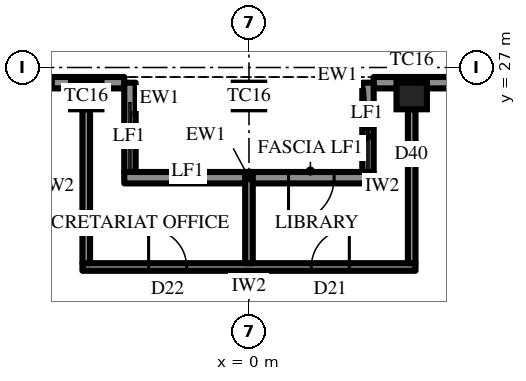
"""IFC4 building model, lengths in metres.
Left out: names, types, materials, properties, quantities, classifications, styles, units other than length and angle.
Written with IfcOpenShell. Run it as: python <this file> out.ifc"""

import sys

from ifc_helpers import new_model, si_unit, direction, frame, frame_2d, origin, origin_2d, place, context, subcontext, project, spatial, rectangle, extrude, element, fill, save


model = new_model("IFC4")
c1 = context("Model", 3, precision=1e-05, world=origin(), true_north=direction((0.0, 1.0)))
c2 = subcontext(c1, "Body", "Model", "MODEL_VIEW")
j1 = project(units=[si_unit("LENGTHUNIT", "METRE"), si_unit("PLANEANGLEUNIT", "RADIAN")], contexts=[c1])
p1 = place(None, origin())
s1 = spatial("IfcSite", under=j1, at=p1, CompositionType="ELEMENT")
p2 = place(p1, origin())
s2 = spatial("IfcBuilding", under=s1, at=p2, CompositionType="ELEMENT")
p3 = place(p2, frame((0.0, 0.0, 382.9)))
s3 = spatial("IfcBuildingStorey", under=s2, at=p3, CompositionType="ELEMENT", Elevation=382.9)
for number, where, z_axis, x_axis in (
    (1, (4.282, 26.25, 0.0), (0.0, 0.0, 1.0), (-1.0, 0.0, 0.0)),
    (2, (0.0, 26.25, 0.0), (0.0, 0.0, 1.0), (-1.0, 0.0, 0.0)),
    (3, (-4.282, 26.25, 0.0), (0.0, 0.0, 1.0), (-1.0, 0.0, 0.0)),
):
    element("IfcColumn", number, at=place(p3, frame(where, z_axis=z_axis, x_axis=x_axis)), inside=s3, PredefinedType="COLUMN", context=c2, shape_type="SweptSolid", body=[
        extrude(rectangle(XDim=0.8, YDim=0.7, at=origin_2d()), origin(), (0.0, 0.0, 1.0), 4.2),
    ])
p4 = place(p3, frame((12.846, 26.6, 0.0), z_axis=(0.0, 0.0, 1.0), x_axis=(-1.0, 0.0, 0.0)))
e4 = element("IfcWall", 4, at=p4, inside=s3, PredefinedType="SOLIDWALL", context=c2, shape_type="SweptSolid", body=[
    extrude(rectangle(XDim=9.564, YDim=0.3, at=frame_2d((4.782, 0.0))), origin(), (0.0, 0.0, 1.0), 2.9),
])
p5 = place(p4, frame((0.866, 0.0, 0.6)))
e5 = element("IfcOpeningElement", 5, at=p5, cuts=e4, PredefinedType="OPENING", context=c2, shape_type="SweptSolid", body=[
    extrude(rectangle(XDim=2.55, YDim=2.05, at=frame_2d((1.275, 1.025))), frame((0.0, 0.16, 0.0), z_axis=(0.0, -1.0, 0.0), x_axis=(1.0, 0.0, 0.0)), (0.0, 0.0, 1.0), 0.32),
])
p6 = place(p4, frame((5.823, 0.0, 0.0)))
e6 = element("IfcOpeningElement", 6, at=p6, cuts=e4, PredefinedType="OPENING", context=c2, shape_type="SweptSolid", body=[
    extrude(rectangle(XDim=1.2, YDim=2.4, at=frame_2d((0.6, 1.2))), frame((0.0, 0.16, 0.0), z_axis=(0.0, -1.0, 0.0), x_axis=(1.0, 0.0, 0.0)), (0.0, 0.0, 1.0), 0.32),
])
p7 = place(p3, frame((-3.282, 26.6, 0.0), z_axis=(0.0, 0.0, 1.0), x_axis=(-1.0, 0.0, 0.0)))
e7 = element("IfcWall", 7, at=p7, inside=s3, PredefinedType="SOLIDWALL", context=c2, shape_type="SweptSolid", body=[
    extrude(rectangle(XDim=9.564, YDim=0.3, at=frame_2d((4.782, 0.0))), origin(), (0.0, 0.0, 1.0), 2.9),
])
p8 = place(p7, frame((1.866, 0.0, 0.6)))
e8 = element("IfcOpeningElement", 8, at=p8, cuts=e7, PredefinedType="OPENING", context=c2, shape_type="SweptSolid", body=[
    extrude(rectangle(XDim=2.55, YDim=2.05, at=frame_2d((1.275, 1.025))), frame((0.0, 0.16, 0.0), z_axis=(0.0, -1.0, 0.0), x_axis=(1.0, 0.0, 0.0)), (0.0, 0.0, 1.0), 0.32),
])
p9 = place(p7, frame((6.148, 0.0, 0.6)))
e9 = element("IfcOpeningElement", 9, at=p9, cuts=e7, PredefinedType="OPENING", context=c2, shape_type="SweptSolid", body=[
    extrude(rectangle(XDim=2.55, YDim=2.05, at=frame_2d((1.275, 1.025))), frame((0.0, 0.16, 0.0), z_axis=(0.0, -1.0, 0.0), x_axis=(1.0, 0.0, 0.0)), (0.0, 0.0, 1.0), 0.32),
])
for number, where, z_axis, x_axis in (
    (10, (3.132, 26.6, 0.0), (0.0, 0.0, 1.0), (0.0, -1.0, 0.0)),
    (11, (-3.132, 26.6, 0.0), (0.0, 0.0, 1.0), (0.0, -1.0, 0.0)),
):
    element("IfcWall", number, at=place(p3, frame(where, z_axis=z_axis, x_axis=x_axis)), inside=s3, PredefinedType="SOLIDWALL", context=c2, shape_type="SweptSolid", body=[
        extrude(rectangle(XDim=2.35, YDim=0.3, at=frame_2d((1.175, 0.0))), origin(), (0.0, 0.0, 1.0), 2.9),
    ])
p10 = place(p3, frame((3.282, 24.1, 0.0), z_axis=(0.0, 0.0, 1.0), x_axis=(-1.0, 0.0, 0.0)))
e12 = element("IfcWall", 12, at=p10, inside=s3, PredefinedType="SOLIDWALL", context=c2, shape_type="SweptSolid", body=[
    extrude(rectangle(XDim=6.564, YDim=0.3, at=frame_2d((3.282, 0.0))), origin(), (0.0, 0.0, 1.0), 2.9),
])
p11 = place(p10, frame((1.041, 0.0, 0.0)))
e13 = element("IfcOpeningElement", 13, at=p11, cuts=e12, PredefinedType="OPENING", context=c2, shape_type="SweptSolid", body=[
    extrude(rectangle(XDim=1.2, YDim=2.4, at=frame_2d((0.6, 1.2))), frame((0.0, 0.16, 0.0), z_axis=(0.0, -1.0, 0.0), x_axis=(1.0, 0.0, 0.0)), (0.0, 0.0, 1.0), 0.32),
])
p12 = place(p3, frame((4.382, 21.75, 0.0), z_axis=(0.0, 0.0, 1.0), x_axis=(-1.0, 0.0, 0.0)))
e14 = element("IfcWall", 14, at=p12, inside=s3, PredefinedType="PARTITIONING", context=c2, shape_type="SweptSolid", body=[
    extrude(rectangle(XDim=8.764, YDim=0.2, at=frame_2d((4.382, 0.0))), origin(), (0.0, 0.0, 1.0), 4.0),
])
p13 = place(p12, frame((1.741, 0.0, 0.0)))
e15 = element("IfcOpeningElement", 15, at=p13, cuts=e14, PredefinedType="OPENING", context=c2, shape_type="SweptSolid", body=[
    extrude(rectangle(XDim=1.0, YDim=2.2, at=frame_2d((0.5, 1.1))), frame((0.0, 0.11, 0.0), z_axis=(0.0, -1.0, 0.0), x_axis=(1.0, 0.0, 0.0)), (0.0, 0.0, 1.0), 0.22),
])
p14 = place(p12, frame((6.023, 0.0, 0.0)))
e16 = element("IfcOpeningElement", 16, at=p14, cuts=e14, PredefinedType="OPENING", context=c2, shape_type="SweptSolid", body=[
    extrude(rectangle(XDim=1.0, YDim=2.2, at=frame_2d((0.5, 1.1))), frame((0.0, 0.11, 0.0), z_axis=(0.0, -1.0, 0.0), x_axis=(1.0, 0.0, 0.0)), (0.0, 0.0, 1.0), 0.22),
])
p15 = place(p3, frame((4.282, 21.85, 0.0), z_axis=(0.0, 0.0, 1.0), x_axis=(0.0, 1.0, 0.0)))
e17 = element("IfcWall", 17, at=p15, inside=s3, PredefinedType="PARTITIONING", context=c2, shape_type="SweptSolid", body=[
    extrude(rectangle(XDim=4.05, YDim=0.2, at=frame_2d((2.025, 0.0))), origin(), (0.0, 0.0, 1.0), 2.992),
])
p16 = place(p3, frame((0.0, 21.85, 0.0), z_axis=(0.0, 0.0, 1.0), x_axis=(0.0, 1.0, 0.0)))
e18 = element("IfcWall", 18, at=p16, inside=s3, PredefinedType="PARTITIONING", context=c2, shape_type="SweptSolid", body=[
    extrude(rectangle(XDim=2.401, YDim=0.2, at=frame_2d((1.2, 0.0))), origin(), (0.0, 0.0, 1.0), 2.992),
])
p17 = place(p3, frame((-4.282, 21.85, 0.0), z_axis=(0.0, 0.0, 1.0), x_axis=(0.0, 1.0, 0.0)))
e19 = element("IfcWall", 19, at=p17, inside=s3, PredefinedType="PARTITIONING", context=c2, shape_type="SweptSolid", body=[
    extrude(rectangle(XDim=4.05, YDim=0.2, at=frame_2d((2.025, 0.0))), origin(), (0.0, 0.0, 1.0), 2.992),
])
p18 = place(p8, origin())
e20 = element("IfcWindow", 20, at=p18, inside=s3, PartitioningType="SINGLE_PANEL", PredefinedType="WINDOW", context=c2, shape_type="SweptSolid", body=[
    extrude(rectangle(XDim=2.55, YDim=2.05, at=frame_2d((1.275, 1.025))), frame((0.0, 0.03, 0.0), z_axis=(0.0, -1.0, 0.0), x_axis=(1.0, 0.0, 0.0)), (0.0, 0.0, 1.0), 0.06),
])
fill(e8, e20)
p19 = place(p11, origin())
e21 = element("IfcDoor", 21, at=p19, inside=s3, OperationType="SINGLE_SWING_LEFT", PredefinedType="DOOR", context=c2, shape_type="SweptSolid", body=[
    extrude(rectangle(XDim=1.2, YDim=2.4, at=frame_2d((0.6, 1.2))), frame((0.0, 0.025, 0.0), z_axis=(0.0, -1.0, 0.0), x_axis=(1.0, 0.0, 0.0)), (0.0, 0.0, 1.0), 0.05),
])
fill(e13, e21)
p20 = place(p13, frame((1.0, 0.0, 0.0), z_axis=(0.0, 0.0, 1.0), x_axis=(-1.0, 0.0, 0.0)))
e22 = element("IfcDoor", 22, at=p20, inside=s3, OperationType="SINGLE_SWING_LEFT", PredefinedType="DOOR", context=c2, shape_type="SweptSolid", body=[
    extrude(rectangle(XDim=1.0, YDim=2.2, at=frame_2d((0.5, 1.1))), frame((0.0, 0.025, 0.0), z_axis=(0.0, -1.0, 0.0), x_axis=(1.0, 0.0, 0.0)), (0.0, 0.0, 1.0), 0.05),
])
fill(e15, e22)
p21 = place(p14, frame((1.0, 0.0, 0.0), z_axis=(0.0, 0.0, 1.0), x_axis=(-1.0, 0.0, 0.0)))
e23 = element("IfcDoor", 23, at=p21, inside=s3, OperationType="SINGLE_SWING_RIGHT", PredefinedType="DOOR", context=c2, shape_type="SweptSolid", body=[
    extrude(rectangle(XDim=1.0, YDim=2.2, at=frame_2d((0.5, 1.1))), frame((0.0, 0.025, 0.0), z_axis=(0.0, -1.0, 0.0), x_axis=(1.0, 0.0, 0.0)), (0.0, 0.0, 1.0), 0.05),
])
fill(e16, e23)
save(model, sys.argv[1])
